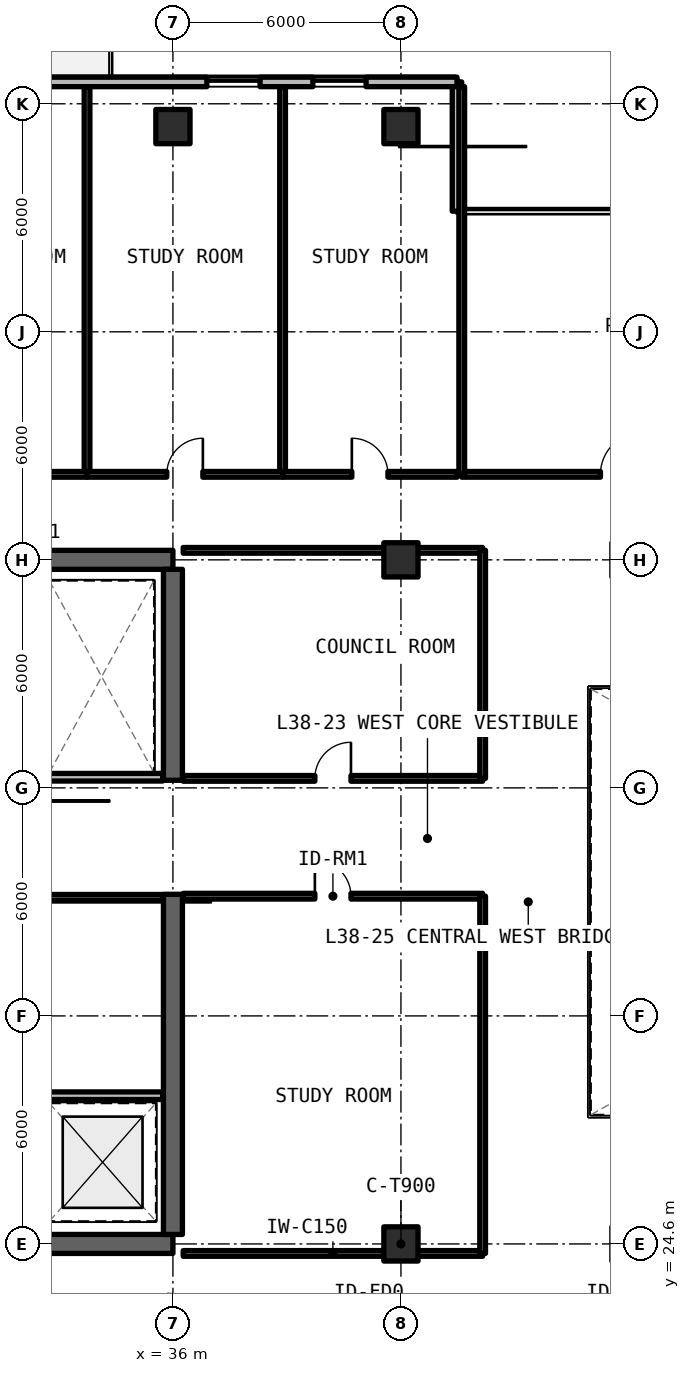
"""IFC4 building model, lengths in metres.
Left out: names, types, materials, properties, quantities, classifications, styles, units other than length and angle.
Written with IfcOpenShell. Run it as: python <this file> out.ifc"""

import sys

from ifc_helpers import new_model, si_unit, direction, frame, frame_2d, origin, origin_2d, place, context, subcontext, project, spatial, rectangle, extrude, element, fill, save


model = new_model("IFC4")
c1 = context("Model", 3, precision=1e-05, world=origin(), true_north=direction((0.0, 1.0)))
c2 = subcontext(c1, "Body", "Model", "MODEL_VIEW")
j1 = project(units=[si_unit("LENGTHUNIT", "METRE"), si_unit("PLANEANGLEUNIT", "RADIAN")], contexts=[c1])
p1 = place(None, origin())
s1 = spatial("IfcSite", under=j1, at=p1, CompositionType="ELEMENT")
p2 = place(p1, origin())
s2 = spatial("IfcBuilding", under=s1, at=p2, CompositionType="ELEMENT")
p3 = place(p2, frame((0.0, 0.0, 138.6)))
s3 = spatial("IfcBuildingStorey", under=s2, at=p3, CompositionType="ELEMENT", Elevation=138.6)
for number, where, z_axis, x_axis in (
    (1, (24.0, 24.6, 0.0), (0.0, 0.0, 1.0), (1.0, 0.0, 0.0)),
    (2, (36.0, 42.6, 0.0), (0.0, 0.0, 1.0), (-1.0, 0.0, 0.0)),
):
    element("IfcWall", number, at=place(p3, frame(where, z_axis=z_axis, x_axis=x_axis)), inside=s3, PredefinedType="SHEAR", context=c2, shape_type="SweptSolid", body=[
        extrude(rectangle(XDim=12.0, YDim=0.5, at=frame_2d((6.0, 0.0))), origin(), (0.0, 0.0, 1.0), 3.3),
    ])
p4 = place(p3, frame((36.0, 24.85, 0.0), z_axis=(0.0, 0.0, 1.0), x_axis=(0.0, 1.0, 0.0)))
e3 = element("IfcWall", 3, at=p4, inside=s3, PredefinedType="SHEAR", context=c2, shape_type="SweptSolid", body=[
    extrude(rectangle(XDim=8.95, YDim=0.5, at=frame_2d((4.475, 0.0))), origin(), (0.0, 0.0, 1.0), 3.3),
])
p5 = place(p3, frame((36.0, 36.8, 0.0), z_axis=(0.0, 0.0, 1.0), x_axis=(0.0, 1.0, 0.0)))
e4 = element("IfcWall", 4, at=p5, inside=s3, PredefinedType="SHEAR", context=c2, shape_type="SweptSolid", body=[
    extrude(rectangle(XDim=5.55, YDim=0.5, at=frame_2d((2.775, 0.0))), origin(), (0.0, 0.0, 1.0), 3.3),
])
for number, where, z_axis, x_axis in (
    (5, (42.0, 24.6, 0.0), (0.0, 0.0, 1.0), (1.0, 0.0, 0.0)),
    (6, (42.0, 42.6, 0.0), (0.0, 0.0, 1.0), (1.0, 0.0, 0.0)),
    (7, (36.0, 54.0, 0.0), (0.0, 0.0, 1.0), (1.0, 0.0, 0.0)),
    (8, (42.0, 54.0, 0.0), (0.0, 0.0, 1.0), (1.0, 0.0, 0.0)),
):
    element("IfcColumn", number, at=place(p3, frame(where, z_axis=z_axis, x_axis=x_axis)), inside=s3, PredefinedType="COLUMN", context=c2, shape_type="SweptSolid", body=[
        extrude(rectangle(XDim=0.9, YDim=0.9, at=origin_2d()), origin(), (0.0, 0.0, 1.0), 3.3),
    ])
p6 = place(p3, frame((43.475, 51.775, 0.0), z_axis=(0.0, 0.0, 1.0), x_axis=(0.0, 1.0, 0.0)))
e9 = element("IfcWall", 9, at=p6, inside=s3, PredefinedType="SOLIDWALL", context=c2, shape_type="SweptSolid", body=[
    extrude(rectangle(XDim=3.4, YDim=0.25, at=frame_2d((1.7, 0.0))), origin(), (0.0, 0.0, 1.0), 3.08),
])
p7 = place(p3, frame((43.475, 55.175, 0.0), z_axis=(0.0, 0.0, 1.0), x_axis=(-1.0, 0.0, 0.0)))
e10 = element("IfcWall", 10, at=p7, inside=s3, PredefinedType="SOLIDWALL", context=c2, shape_type="SweptSolid", body=[
    extrude(rectangle(XDim=19.623, YDim=0.25, at=frame_2d((9.812, 0.0))), origin(), (0.0, 0.0, 1.0), 3.08),
])
p8 = place(p7, frame((15.375, 0.0, 0.0)))
e11 = element("IfcOpeningElement", 11, at=p8, cuts=e10, PredefinedType="OPENING", context=c2, shape_type="SweptSolid", body=[
    extrude(rectangle(XDim=1.1, YDim=2.15, at=frame_2d((0.55, 1.075))), frame((0.0, 0.135, 0.0), z_axis=(0.0, -1.0, 0.0), x_axis=(1.0, 0.0, 0.0)), (0.0, 0.0, 1.0), 0.27),
])
p9 = place(p7, frame((18.08, 0.0, 0.78)))
e12 = element("IfcOpeningElement", 12, at=p9, cuts=e10, PredefinedType="OPENING", context=c2, shape_type="SweptSolid", body=[
    extrude(rectangle(XDim=0.85, YDim=1.65, at=frame_2d((0.425, 0.825))), frame((0.0, 0.135, 0.0), z_axis=(0.0, -1.0, 0.0), x_axis=(1.0, 0.0, 0.0)), (0.0, 0.0, 1.0), 0.27),
])
p10 = place(p7, frame((10.904, 0.0, 0.78)))
e13 = element("IfcOpeningElement", 13, at=p10, cuts=e10, PredefinedType="OPENING", context=c2, shape_type="SweptSolid", body=[
    extrude(rectangle(XDim=1.8, YDim=1.66, at=frame_2d((0.9, 0.83))), frame((0.0, 0.135, 0.0), z_axis=(0.0, -1.0, 0.0), x_axis=(1.0, 0.0, 0.0)), (0.0, 0.0, 1.0), 0.27),
])
p11 = place(p7, frame((5.182, 0.0, 0.78)))
e14 = element("IfcOpeningElement", 14, at=p11, cuts=e10, PredefinedType="OPENING", context=c2, shape_type="SweptSolid", body=[
    extrude(rectangle(XDim=1.4, YDim=1.65, at=frame_2d((0.7, 0.825))), frame((0.0, 0.135, 0.0), z_axis=(0.0, -1.0, 0.0), x_axis=(1.0, 0.0, 0.0)), (0.0, 0.0, 1.0), 0.27),
])
p12 = place(p7, frame((2.392, 0.0, 0.78)))
e15 = element("IfcOpeningElement", 15, at=p12, cuts=e10, PredefinedType="OPENING", context=c2, shape_type="SweptSolid", body=[
    extrude(rectangle(XDim=1.4, YDim=1.65, at=frame_2d((0.7, 0.825))), frame((0.0, 0.135, 0.0), z_axis=(0.0, -1.0, 0.0), x_axis=(1.0, 0.0, 0.0)), (0.0, 0.0, 1.0), 0.27),
])
p13 = place(p3, frame((28.22, 28.5, 0.0), z_axis=(0.0, 0.0, 1.0), x_axis=(1.0, 0.0, 0.0)))
e16 = element("IfcWall", 16, at=p13, inside=s3, PredefinedType="SOLIDWALL", context=c2, shape_type="SweptSolid", body=[
    extrude(rectangle(XDim=7.51, YDim=0.2, at=frame_2d((3.755, 0.0))), origin(), (0.0, 0.0, 1.0), 2.35),
])
p14 = place(p13, frame((2.98, 0.0, 0.0)))
e17 = element("IfcOpeningElement", 17, at=p14, cuts=e16, PredefinedType="OPENING", context=c2, shape_type="SweptSolid", body=[
    extrude(rectangle(XDim=1.0, YDim=2.15, at=frame_2d((0.5, 1.075))), frame((0.0, 0.11, 0.0), z_axis=(0.0, -1.0, 0.0), x_axis=(1.0, 0.0, 0.0)), (0.0, 0.0, 1.0), 0.22),
])
p15 = place(p3, frame((32.68, 33.72, 0.0), z_axis=(0.0, 0.0, 1.0), x_axis=(1.0, 0.0, 0.0)))
e18 = element("IfcWall", 18, at=p15, inside=s3, PredefinedType="SOLIDWALL", context=c2, shape_type="SweptSolid", body=[
    extrude(rectangle(XDim=3.05, YDim=0.15, at=frame_2d((1.525, 0.0))), origin(), (0.0, 0.0, 1.0), 2.35),
])
p16 = place(p3, frame((32.68, 36.88, 0.0), z_axis=(0.0, 0.0, 1.0), x_axis=(1.0, 0.0, 0.0)))
e19 = element("IfcWall", 19, at=p16, inside=s3, PredefinedType="SOLIDWALL", context=c2, shape_type="SweptSolid", body=[
    extrude(rectangle(XDim=3.05, YDim=0.2, at=frame_2d((1.525, 0.0))), origin(), (0.0, 0.0, 1.0), 2.35),
])
p17 = place(p3, frame((36.27, 24.35, 0.0), z_axis=(0.0, 0.0, 1.0), x_axis=(1.0, 0.0, 0.0)))
e20 = element("IfcWall", 20, at=p17, inside=s3, PredefinedType="SOLIDWALL", context=c2, shape_type="SweptSolid", body=[
    extrude(rectangle(XDim=7.88, YDim=0.15, at=frame_2d((3.94, 0.0))), origin(), (0.0, 0.0, 1.0), 2.35),
])
p18 = place(p3, frame((36.27, 33.75, 0.0), z_axis=(0.0, 0.0, 1.0), x_axis=(1.0, 0.0, 0.0)))
e21 = element("IfcWall", 21, at=p18, inside=s3, PredefinedType="SOLIDWALL", context=c2, shape_type="SweptSolid", body=[
    extrude(rectangle(XDim=7.88, YDim=0.15, at=frame_2d((3.94, 0.0))), origin(), (0.0, 0.0, 1.0), 2.35),
])
p19 = place(p18, frame((3.465, 0.0, 0.0)))
e22 = element("IfcOpeningElement", 22, at=p19, cuts=e21, PredefinedType="OPENING", context=c2, shape_type="SweptSolid", body=[
    extrude(rectangle(XDim=0.95, YDim=2.15, at=frame_2d((0.475, 1.075))), frame((0.0, 0.085, 0.0), z_axis=(0.0, -1.0, 0.0), x_axis=(1.0, 0.0, 0.0)), (0.0, 0.0, 1.0), 0.17),
])
p20 = place(p3, frame((44.15, 24.35, 0.0), z_axis=(0.0, 0.0, 1.0), x_axis=(0.0, 1.0, 0.0)))
e23 = element("IfcWall", 23, at=p20, inside=s3, PredefinedType="SOLIDWALL", context=c2, shape_type="SweptSolid", body=[
    extrude(rectangle(XDim=9.4, YDim=0.15, at=frame_2d((4.7, 0.0))), origin(), (0.0, 0.0, 1.0), 2.35),
])
p21 = place(p3, frame((36.27, 36.85, 0.0), z_axis=(0.0, 0.0, 1.0), x_axis=(1.0, 0.0, 0.0)))
e24 = element("IfcWall", 24, at=p21, inside=s3, PredefinedType="SOLIDWALL", context=c2, shape_type="SweptSolid", body=[
    extrude(rectangle(XDim=7.88, YDim=0.15, at=frame_2d((3.94, 0.0))), origin(), (0.0, 0.0, 1.0), 2.35),
])
p22 = place(p21, frame((3.465, 0.0, 0.0)))
e25 = element("IfcOpeningElement", 25, at=p22, cuts=e24, PredefinedType="OPENING", context=c2, shape_type="SweptSolid", body=[
    extrude(rectangle(XDim=0.95, YDim=2.15, at=frame_2d((0.475, 1.075))), frame((0.0, 0.085, 0.0), z_axis=(0.0, -1.0, 0.0), x_axis=(1.0, 0.0, 0.0)), (0.0, 0.0, 1.0), 0.17),
])
p23 = place(p3, frame((36.27, 42.85, 0.0), z_axis=(0.0, 0.0, 1.0), x_axis=(1.0, 0.0, 0.0)))
e26 = element("IfcWall", 26, at=p23, inside=s3, PredefinedType="SOLIDWALL", context=c2, shape_type="SweptSolid", body=[
    extrude(rectangle(XDim=7.88, YDim=0.15, at=frame_2d((3.94, 0.0))), origin(), (0.0, 0.0, 1.0), 2.35),
])
p24 = place(p3, frame((44.15, 36.85, 0.0), z_axis=(0.0, 0.0, 1.0), x_axis=(0.0, 1.0, 0.0)))
e27 = element("IfcWall", 27, at=p24, inside=s3, PredefinedType="SOLIDWALL", context=c2, shape_type="SweptSolid", body=[
    extrude(rectangle(XDim=6.0, YDim=0.15, at=frame_2d((3.0, 0.0))), origin(), (0.0, 0.0, 1.0), 2.35),
])
p25 = place(p3, frame((43.6, 44.85, 0.0), z_axis=(0.0, 0.0, 1.0), x_axis=(1.0, 0.0, 0.0)))
e28 = element("IfcWall", 28, at=p25, inside=s3, PredefinedType="SOLIDWALL", context=c2, shape_type="SweptSolid", body=[
    extrude(rectangle(XDim=8.4, YDim=0.15, at=frame_2d((4.2, 0.0))), origin(), (0.0, 0.0, 1.0), 2.35),
])
p26 = place(p25, frame((3.65, 0.0, 0.0)))
e29 = element("IfcOpeningElement", 29, at=p26, cuts=e28, PredefinedType="OPENING", context=c2, shape_type="SweptSolid", body=[
    extrude(rectangle(XDim=1.1, YDim=2.15, at=frame_2d((0.55, 1.075))), frame((0.0, 0.085, 0.0), z_axis=(0.0, -1.0, 0.0), x_axis=(1.0, 0.0, 0.0)), (0.0, 0.0, 1.0), 0.17),
])
for number, where, z_axis, x_axis in (
    (30, (43.6, 44.85, 0.0), (0.0, 0.0, 1.0), (0.0, 1.0, 0.0)),
    (31, (33.74, 44.85, 0.0), (0.0, 0.0, 1.0), (0.0, 1.0, 0.0)),
):
    element("IfcWall", number, at=place(p3, frame(where, z_axis=z_axis, x_axis=x_axis)), inside=s3, PredefinedType="SOLIDWALL", context=c2, shape_type="SweptSolid", body=[
        extrude(rectangle(XDim=10.2, YDim=0.15, at=frame_2d((5.1, 0.0))), origin(), (0.0, 0.0, 1.0), 2.35),
    ])
p27 = place(p3, frame((28.962, 44.85, 0.0), z_axis=(0.0, 0.0, 1.0), x_axis=(1.0, 0.0, 0.0)))
e32 = element("IfcWall", 32, at=p27, inside=s3, PredefinedType="SOLIDWALL", context=c2, shape_type="SweptSolid", body=[
    extrude(rectangle(XDim=4.778, YDim=0.15, at=frame_2d((2.389, 0.0))), origin(), (0.0, 0.0, 1.0), 2.35),
])
p28 = place(p27, frame((1.839, 0.0, 0.0)))
e33 = element("IfcOpeningElement", 33, at=p28, cuts=e32, PredefinedType="OPENING", context=c2, shape_type="SweptSolid", body=[
    extrude(rectangle(XDim=1.1, YDim=2.15, at=frame_2d((0.55, 1.075))), frame((0.0, 0.085, 0.0), z_axis=(0.0, -1.0, 0.0), x_axis=(1.0, 0.0, 0.0)), (0.0, 0.0, 1.0), 0.17),
])
p29 = place(p3, frame((38.886, 44.85, 0.0), z_axis=(0.0, 0.0, 1.0), x_axis=(0.0, 1.0, 0.0)))
e34 = element("IfcWall", 34, at=p29, inside=s3, PredefinedType="SOLIDWALL", context=c2, shape_type="SweptSolid", body=[
    extrude(rectangle(XDim=10.2, YDim=0.15, at=frame_2d((5.1, 0.0))), origin(), (0.0, 0.0, 1.0), 2.35),
])
p30 = place(p3, frame((33.74, 44.85, 0.0), z_axis=(0.0, 0.0, 1.0), x_axis=(1.0, 0.0, 0.0)))
e35 = element("IfcWall", 35, at=p30, inside=s3, PredefinedType="SOLIDWALL", context=c2, shape_type="SweptSolid", body=[
    extrude(rectangle(XDim=5.146, YDim=0.15, at=frame_2d((2.573, 0.0))), origin(), (0.0, 0.0, 1.0), 2.35),
])
p31 = place(p30, frame((2.098, 0.0, 0.0)))
e36 = element("IfcOpeningElement", 36, at=p31, cuts=e35, PredefinedType="OPENING", context=c2, shape_type="SweptSolid", body=[
    extrude(rectangle(XDim=0.95, YDim=2.15, at=frame_2d((0.475, 1.075))), frame((0.0, 0.085, 0.0), z_axis=(0.0, -1.0, 0.0), x_axis=(1.0, 0.0, 0.0)), (0.0, 0.0, 1.0), 0.17),
])
p32 = place(p3, frame((38.886, 44.85, 0.0), z_axis=(0.0, 0.0, 1.0), x_axis=(1.0, 0.0, 0.0)))
e37 = element("IfcWall", 37, at=p32, inside=s3, PredefinedType="SOLIDWALL", context=c2, shape_type="SweptSolid", body=[
    extrude(rectangle(XDim=4.594, YDim=0.15, at=frame_2d((2.297, 0.0))), origin(), (0.0, 0.0, 1.0), 2.35),
])
p33 = place(p32, frame((1.822, 0.0, 0.0)))
e38 = element("IfcOpeningElement", 38, at=p33, cuts=e37, PredefinedType="OPENING", context=c2, shape_type="SweptSolid", body=[
    extrude(rectangle(XDim=0.95, YDim=2.15, at=frame_2d((0.475, 1.075))), frame((0.0, 0.085, 0.0), z_axis=(0.0, -1.0, 0.0), x_axis=(1.0, 0.0, 0.0)), (0.0, 0.0, 1.0), 0.17),
])
p34 = place(p11, origin())
e39 = element("IfcWindow", 39, at=p34, inside=s3, PartitioningType="SINGLE_PANEL", PredefinedType="WINDOW", context=c2, shape_type="SweptSolid", body=[
    extrude(rectangle(XDim=1.4, YDim=1.65, at=frame_2d((0.7, 0.825))), frame((0.0, 0.03, 0.0), z_axis=(0.0, -1.0, 0.0), x_axis=(1.0, 0.0, 0.0)), (0.0, 0.0, 1.0), 0.06),
])
fill(e14, e39)
p35 = place(p12, origin())
e40 = element("IfcWindow", 40, at=p35, inside=s3, PartitioningType="SINGLE_PANEL", PredefinedType="WINDOW", context=c2, shape_type="SweptSolid", body=[
    extrude(rectangle(XDim=1.4, YDim=1.65, at=frame_2d((0.7, 0.825))), frame((0.0, 0.03, 0.0), z_axis=(0.0, -1.0, 0.0), x_axis=(1.0, 0.0, 0.0)), (0.0, 0.0, 1.0), 0.06),
])
fill(e15, e40)
p36 = place(p19, origin())
e41 = element("IfcDoor", 41, at=p36, inside=s3, OperationType="SINGLE_SWING_LEFT", PredefinedType="DOOR", context=c2, shape_type="SweptSolid", body=[
    extrude(rectangle(XDim=0.95, YDim=2.15, at=frame_2d((0.475, 1.075))), frame((0.0, 0.025, 0.0), z_axis=(0.0, -1.0, 0.0), x_axis=(1.0, 0.0, 0.0)), (0.0, 0.0, 1.0), 0.05),
])
fill(e22, e41)
p37 = place(p22, origin())
e42 = element("IfcDoor", 42, at=p37, inside=s3, OperationType="SINGLE_SWING_RIGHT", PredefinedType="DOOR", context=c2, shape_type="SweptSolid", body=[
    extrude(rectangle(XDim=0.95, YDim=2.15, at=frame_2d((0.475, 1.075))), frame((0.0, 0.025, 0.0), z_axis=(0.0, -1.0, 0.0), x_axis=(1.0, 0.0, 0.0)), (0.0, 0.0, 1.0), 0.05),
])
fill(e25, e42)
p38 = place(p26, origin())
e43 = element("IfcDoor", 43, at=p38, inside=s3, OperationType="SINGLE_SWING_RIGHT", PredefinedType="DOOR", context=c2, shape_type="SweptSolid", body=[
    extrude(rectangle(XDim=1.1, YDim=2.15, at=frame_2d((0.55, 1.075))), frame((0.0, 0.025, 0.0), z_axis=(0.0, -1.0, 0.0), x_axis=(1.0, 0.0, 0.0)), (0.0, 0.0, 1.0), 0.05),
])
fill(e29, e43)
p39 = place(p31, origin())
e44 = element("IfcDoor", 44, at=p39, inside=s3, OperationType="SINGLE_SWING_RIGHT", PredefinedType="DOOR", context=c2, shape_type="SweptSolid", body=[
    extrude(rectangle(XDim=0.95, YDim=2.15, at=frame_2d((0.475, 1.075))), frame((0.0, 0.025, 0.0), z_axis=(0.0, -1.0, 0.0), x_axis=(1.0, 0.0, 0.0)), (0.0, 0.0, 1.0), 0.05),
])
fill(e36, e44)
p40 = place(p33, origin())
e45 = element("IfcDoor", 45, at=p40, inside=s3, OperationType="SINGLE_SWING_LEFT", PredefinedType="DOOR", context=c2, shape_type="SweptSolid", body=[
    extrude(rectangle(XDim=0.95, YDim=2.15, at=frame_2d((0.475, 1.075))), frame((0.0, 0.025, 0.0), z_axis=(0.0, -1.0, 0.0), x_axis=(1.0, 0.0, 0.0)), (0.0, 0.0, 1.0), 0.05),
])
fill(e38, e45)
save(model, sys.argv[1])
